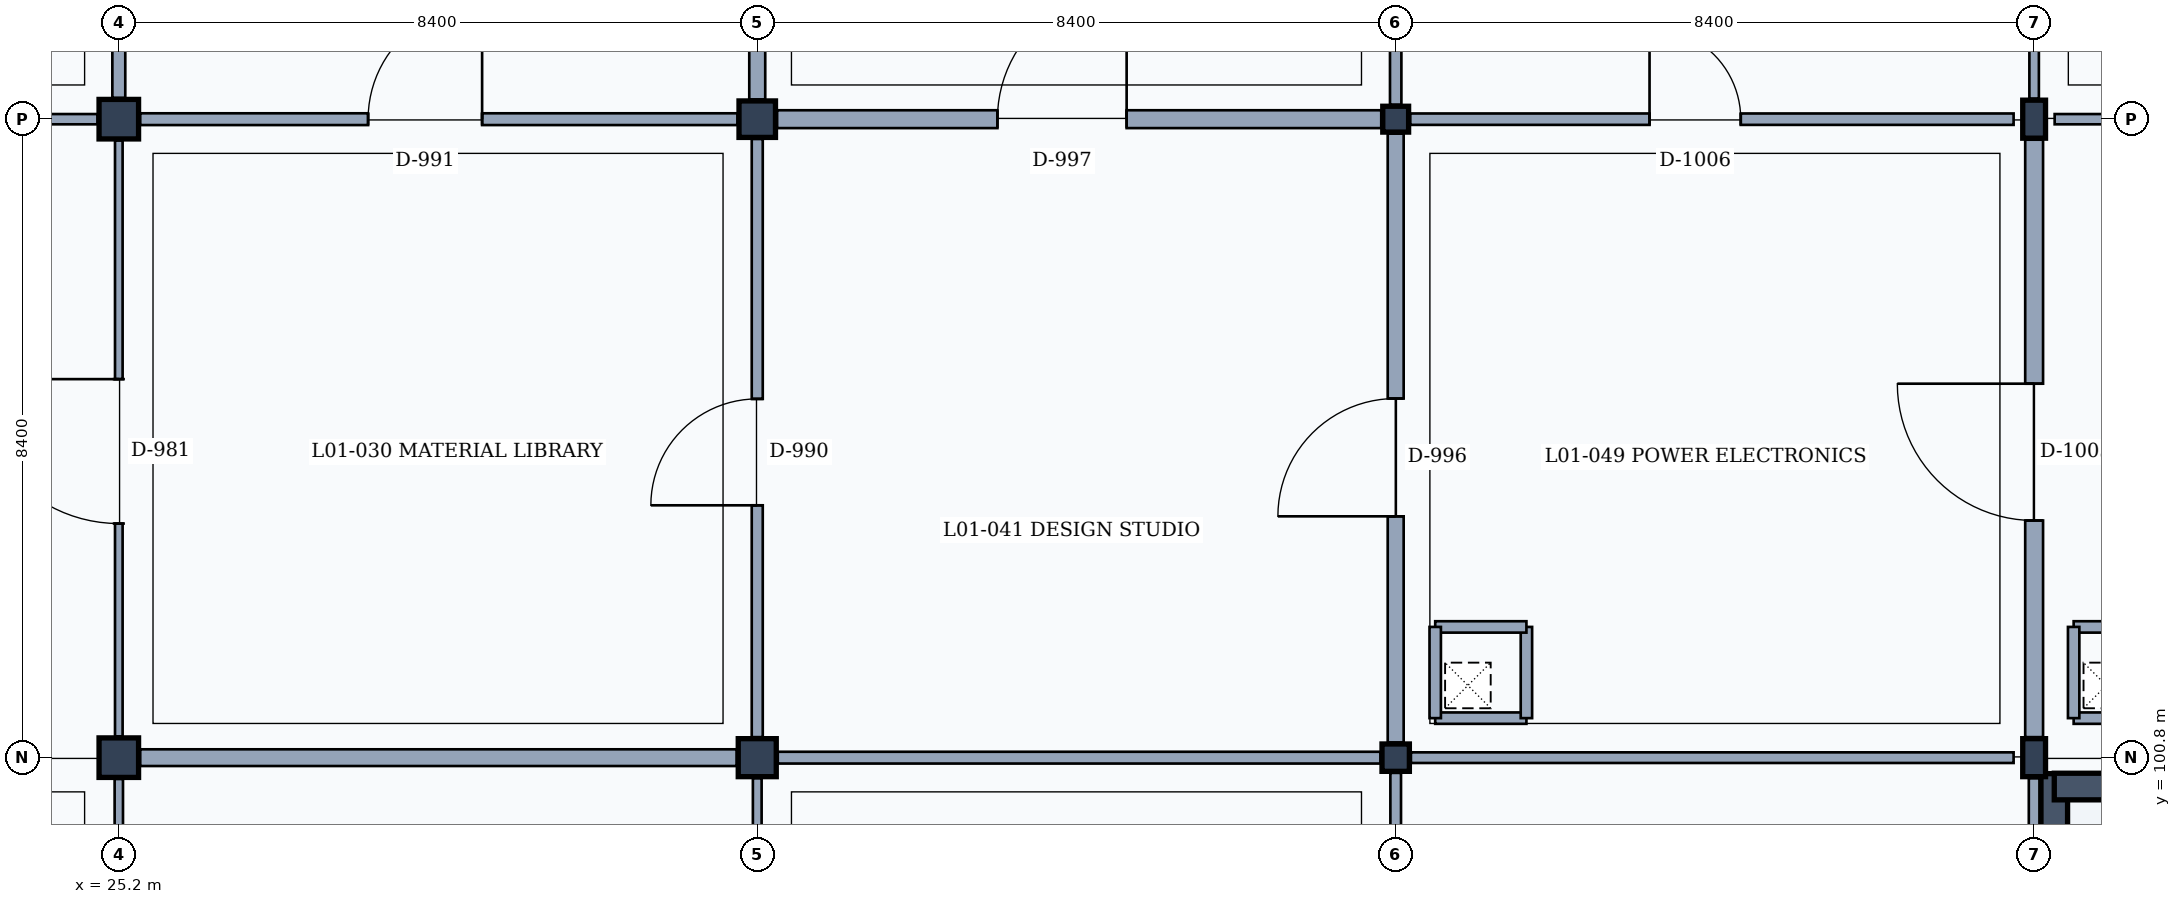
"""IFC4 building model, lengths in metres.
Left out: names, types, materials, properties, quantities, classifications, styles, units other than length and angle.
Written with IfcOpenShell. Run it as: python <this file> out.ifc"""

import sys

from ifc_helpers import new_model, si_unit, direction, frame, frame_2d, origin, origin_2d, place, context, subcontext, project, spatial, rectangle, i_section, extrude, element, fill, save


model = new_model("IFC4")
c1 = context("Model", 3, precision=1e-05, world=origin(), true_north=direction((0.0, 1.0)))
c2 = subcontext(c1, "Body", "Model", "MODEL_VIEW")
j1 = project(units=[si_unit("LENGTHUNIT", "METRE"), si_unit("PLANEANGLEUNIT", "RADIAN")], contexts=[c1])
p1 = place(None, origin())
s1 = spatial("IfcSite", under=j1, at=p1, CompositionType="ELEMENT")
p2 = place(p1, origin())
s2 = spatial("IfcBuilding", under=s1, at=p2, CompositionType="ELEMENT")
p3 = place(p2, frame((0.0, 0.0, 4.8)))
s3 = spatial("IfcBuildingStorey", under=s2, at=p3, CompositionType="ELEMENT", Elevation=4.8)
for number, where, z_axis, x_axis in (
    (1, (25.2, 100.8, 0.0), (0.0, 0.0, 1.0), (1.0, 0.0, 0.0)),
    (2, (25.2, 109.2, 0.0), (0.0, 0.0, 1.0), (1.0, 0.0, 0.0)),
):
    element("IfcColumn", number, at=place(p3, frame(where, z_axis=z_axis, x_axis=x_axis)), inside=s3, PredefinedType="COLUMN", context=c2, shape_type="SweptSolid", body=[
        extrude(rectangle(XDim=0.52, YDim=0.52, at=origin_2d()), origin(), (0.0, 0.0, 1.0), 4.8),
    ])
p4 = place(p3, frame((33.6, 100.8, 0.0), z_axis=(0.0, 0.0, 1.0), x_axis=(1.0, 0.0, 0.0)))
e3 = element("IfcColumn", 3, at=p4, inside=s3, PredefinedType="COLUMN", context=c2, shape_type="SweptSolid", body=[
    extrude(rectangle(XDim=0.5, YDim=0.5, at=origin_2d()), origin(), (0.0, 0.0, 1.0), 4.8),
])
p5 = place(p3, frame((33.6, 109.2, 0.0), z_axis=(0.0, 0.0, 1.0), x_axis=(1.0, 0.0, 0.0)))
e4 = element("IfcColumn", 4, at=p5, inside=s3, PredefinedType="COLUMN", context=c2, shape_type="SweptSolid", body=[
    extrude(rectangle(XDim=0.48, YDim=0.48, at=origin_2d()), origin(), (0.0, 0.0, 1.0), 4.8),
])
p6 = place(p3, frame((42.0, 100.8, 0.0), z_axis=(0.0, 0.0, 1.0), x_axis=(1.0, 0.0, 0.0)))
e5 = element("IfcColumn", 5, at=p6, inside=s3, PredefinedType="COLUMN", context=c2, shape_type="SweptSolid", body=[
    extrude(rectangle(XDim=0.36, YDim=0.36, at=origin_2d()), origin(), (0.0, 0.0, 1.0), 4.8),
])
p7 = place(p3, frame((42.0, 109.2, 0.0), z_axis=(0.0, 0.0, 1.0), x_axis=(1.0, 0.0, 0.0)))
e6 = element("IfcColumn", 6, at=p7, inside=s3, PredefinedType="COLUMN", context=c2, shape_type="SweptSolid", body=[
    extrude(rectangle(XDim=0.34, YDim=0.34, at=origin_2d()), origin(), (0.0, 0.0, 1.0), 4.8),
])
for number, where, z_axis, x_axis in (
    (7, (50.4, 100.8, 0.0), (0.0, 0.0, 1.0), (1.0, 0.0, 0.0)),
    (8, (50.4, 109.2, 0.0), (0.0, 0.0, 1.0), (1.0, 0.0, 0.0)),
):
    element("IfcColumn", number, at=place(p3, frame(where, z_axis=z_axis, x_axis=x_axis)), inside=s3, PredefinedType="COLUMN", context=c2, shape_type="SweptSolid", body=[
        extrude(i_section(OverallWidth=0.3, OverallDepth=0.5, WebThickness=0.014, FlangeThickness=0.028, FilletRadius=0.027, at=origin_2d()), origin(), (0.0, 0.0, 1.0), 4.8),
    ])
p8 = place(p3, frame((50.665, 92.65, 0.0), z_axis=(0.0, 0.0, 1.0), x_axis=(0.0, 1.0, 0.0)))
e9 = element("IfcWall", 9, at=p8, inside=s3, PredefinedType="SHEAR", context=c2, shape_type="SweptSolid", body=[
    extrude(rectangle(XDim=7.94, YDim=0.35, at=frame_2d((3.97, 0.0))), origin(), (0.0, 0.0, 1.0), 4.56),
])
p9 = place(p3, frame((50.665, 100.42, 0.0), z_axis=(0.0, 0.0, 1.0), x_axis=(1.0, 0.0, 0.0)))
e10 = element("IfcWall", 10, at=p9, inside=s3, PredefinedType="SHEAR", context=c2, shape_type="SweptSolid", body=[
    extrude(rectangle(XDim=7.875, YDim=0.35, at=frame_2d((3.938, 0.0))), origin(), (0.0, 0.0, 1.0), 4.56),
])
for number, where, z_axis, x_axis in (
    (11, (42.52, 101.32, 0.0), (0.0, 0.0, 1.0), (1.0, 0.0, 0.0)),
    (12, (43.72, 101.32, 0.0), (0.0, 0.0, 1.0), (0.0, 1.0, 0.0)),
    (13, (43.72, 102.52, 0.0), (0.0, 0.0, 1.0), (-1.0, 0.0, 0.0)),
    (14, (42.52, 102.52, 0.0), (0.0, 0.0, 1.0), (0.0, -1.0, 0.0)),
):
    element("IfcWall", number, at=place(p3, frame(where, z_axis=z_axis, x_axis=x_axis)), inside=s3, PredefinedType="PARTITIONING", context=c2, shape_type="SweptSolid", body=[
        extrude(rectangle(XDim=1.2, YDim=0.15, at=frame_2d((0.6, 0.0))), origin(), (0.0, 0.0, 1.0), 4.53),
    ])
for number, where, z_axis, x_axis in (
    (15, (50.92, 101.32, 0.0), (0.0, 0.0, 1.0), (1.0, 0.0, 0.0)),
    (16, (52.12, 102.52, 0.0), (0.0, 0.0, 1.0), (-1.0, 0.0, 0.0)),
):
    element("IfcWall", number, at=place(p3, frame(where, z_axis=z_axis, x_axis=x_axis)), inside=s3, PredefinedType="PARTITIONING", context=c2, shape_type="SweptSolid", body=[
        extrude(rectangle(XDim=1.2, YDim=0.15, at=frame_2d((0.6, 0.0))), origin(), (0.0, 0.0, 1.0), 4.56),
    ])
p10 = place(p3, frame((50.92, 102.52, 0.0), z_axis=(0.0, 0.0, 1.0), x_axis=(0.0, -1.0, 0.0)))
e17 = element("IfcWall", 17, at=p10, inside=s3, PredefinedType="PARTITIONING", context=c2, shape_type="SweptSolid", body=[
    extrude(rectangle(XDim=1.2, YDim=0.15, at=frame_2d((0.6, 0.0))), origin(), (0.0, 0.0, 1.0), 4.56),
])
p11 = place(p3, frame((25.2, 92.68, 0.0), z_axis=(0.0, 0.0, 1.0), x_axis=(0.0, 1.0, 0.0)))
e18 = element("IfcWall", 18, at=p11, inside=s3, PredefinedType="PARTITIONING", context=c2, shape_type="SweptSolid", body=[
    extrude(rectangle(XDim=7.84, YDim=0.11, at=frame_2d((3.92, 0.0))), origin(), (0.0, 0.0, 1.0), 3.92),
])
p12 = place(p11, frame((2.9, 0.0, 0.0)))
e19 = element("IfcOpeningElement", 19, at=p12, cuts=e18, PredefinedType="OPENING", context=c2, shape_type="SweptSolid", body=[
    extrude(rectangle(XDim=1.7, YDim=2.3, at=frame_2d((0.85, 1.15))), frame((0.0, 0.065, 0.0), z_axis=(0.0, -1.0, 0.0), x_axis=(1.0, 0.0, 0.0)), (0.0, 0.0, 1.0), 0.13),
])
p13 = place(p3, frame((25.2, 101.08, 0.0), z_axis=(0.0, 0.0, 1.0), x_axis=(0.0, 1.0, 0.0)))
e20 = element("IfcWall", 20, at=p13, inside=s3, PredefinedType="MOVABLE", context=c2, shape_type="SweptSolid", body=[
    extrude(rectangle(XDim=7.84, YDim=0.1, at=frame_2d((3.92, 0.0))), origin(), (0.0, 0.0, 1.0), 3.92),
])
p14 = place(p13, frame((2.8, 0.0, 0.0)))
e21 = element("IfcOpeningElement", 21, at=p14, cuts=e20, PredefinedType="OPENING", context=c2, shape_type="SweptSolid", body=[
    extrude(rectangle(XDim=1.9, YDim=2.4, at=frame_2d((0.95, 1.2))), frame((0.0, 0.06, 0.0), z_axis=(0.0, -1.0, 0.0), x_axis=(1.0, 0.0, 0.0)), (0.0, 0.0, 1.0), 0.12),
])
p15 = place(p3, frame((17.08, 109.2, 0.0), z_axis=(0.0, 0.0, 1.0), x_axis=(1.0, 0.0, 0.0)))
e22 = element("IfcWall", 22, at=p15, inside=s3, PredefinedType="PARTITIONING", context=c2, shape_type="SweptSolid", body=[
    extrude(rectangle(XDim=7.84, YDim=0.135, at=frame_2d((3.92, 0.0))), origin(), (0.0, 0.0, 1.0), 3.92),
])
p16 = place(p15, frame((3.3, 0.0, 0.0)))
e23 = element("IfcOpeningElement", 23, at=p16, cuts=e22, PredefinedType="OPENING", context=c2, shape_type="SweptSolid", body=[
    extrude(rectangle(XDim=0.9, YDim=2.1, at=frame_2d((0.45, 1.05))), frame((0.0, 0.077, 0.0), z_axis=(0.0, -1.0, 0.0), x_axis=(1.0, 0.0, 0.0)), (0.0, 0.0, 1.0), 0.155),
])
p17 = place(p3, frame((25.2, 109.48, 0.0), z_axis=(0.0, 0.0, 1.0), x_axis=(0.0, 1.0, 0.0)))
e24 = element("IfcWall", 24, at=p17, inside=s3, PredefinedType="PARTITIONING", context=c2, shape_type="SweptSolid", body=[
    extrude(rectangle(XDim=7.84, YDim=0.17, at=frame_2d((3.92, 0.0))), origin(), (0.0, 0.0, 1.0), 3.92),
])
p18 = place(p3, frame((33.6, 92.66, 0.0), z_axis=(0.0, 0.0, 1.0), x_axis=(0.0, 1.0, 0.0)))
e25 = element("IfcWall", 25, at=p18, inside=s3, PredefinedType="PARTITIONING", context=c2, shape_type="SweptSolid", body=[
    extrude(rectangle(XDim=7.87, YDim=0.115, at=frame_2d((3.935, 0.0))), origin(), (0.0, 0.0, 1.0), 3.92),
])
p19 = place(p3, frame((25.48, 100.8, 0.0), z_axis=(0.0, 0.0, 1.0), x_axis=(1.0, 0.0, 0.0)))
e26 = element("IfcWall", 26, at=p19, inside=s3, PredefinedType="PARTITIONING", context=c2, shape_type="SweptSolid", body=[
    extrude(rectangle(XDim=7.85, YDim=0.22, at=frame_2d((3.925, 0.0))), origin(), (0.0, 0.0, 1.0), 3.89),
])
p20 = place(p3, frame((33.6, 101.07, 0.0), z_axis=(0.0, 0.0, 1.0), x_axis=(0.0, 1.0, 0.0)))
e27 = element("IfcWall", 27, at=p20, inside=s3, PredefinedType="PARTITIONING", context=c2, shape_type="SweptSolid", body=[
    extrude(rectangle(XDim=7.87, YDim=0.145, at=frame_2d((3.935, 0.0))), origin(), (0.0, 0.0, 1.0), 3.92),
])
p21 = place(p20, frame((3.05, 0.0, 0.0)))
e28 = element("IfcOpeningElement", 28, at=p21, cuts=e27, PredefinedType="OPENING", context=c2, shape_type="SweptSolid", body=[
    extrude(rectangle(XDim=1.4, YDim=2.25, at=frame_2d((0.7, 1.125))), frame((0.0, 0.083, 0.0), z_axis=(0.0, -1.0, 0.0), x_axis=(1.0, 0.0, 0.0)), (0.0, 0.0, 1.0), 0.165),
])
p22 = place(p3, frame((25.48, 109.2, 0.0), z_axis=(0.0, 0.0, 1.0), x_axis=(1.0, 0.0, 0.0)))
e29 = element("IfcWall", 29, at=p22, inside=s3, PredefinedType="PARTITIONING", context=c2, shape_type="SweptSolid", body=[
    extrude(rectangle(XDim=7.86, YDim=0.155, at=frame_2d((3.93, 0.0))), origin(), (0.0, 0.0, 1.0), 3.89),
])
p23 = place(p22, frame((3.0, 0.0, 0.0)))
e30 = element("IfcOpeningElement", 30, at=p23, cuts=e29, PredefinedType="OPENING", context=c2, shape_type="SweptSolid", body=[
    extrude(rectangle(XDim=1.5, YDim=2.3, at=frame_2d((0.75, 1.15))), frame((0.0, 0.087, 0.0), z_axis=(0.0, -1.0, 0.0), x_axis=(1.0, 0.0, 0.0)), (0.0, 0.0, 1.0), 0.175),
])
p24 = place(p3, frame((33.6, 109.46, 0.0), z_axis=(0.0, 0.0, 1.0), x_axis=(0.0, 1.0, 0.0)))
e31 = element("IfcWall", 31, at=p24, inside=s3, PredefinedType="PARTITIONING", context=c2, shape_type="SweptSolid", body=[
    extrude(rectangle(XDim=7.87, YDim=0.21, at=frame_2d((3.935, 0.0))), origin(), (0.0, 0.0, 1.0), 3.92),
])
p25 = place(p3, frame((42.0, 92.59, 0.0), z_axis=(0.0, 0.0, 1.0), x_axis=(0.0, 1.0, 0.0)))
e32 = element("IfcWall", 32, at=p25, inside=s3, PredefinedType="PARTITIONING", context=c2, shape_type="SweptSolid", body=[
    extrude(rectangle(XDim=8.01, YDim=0.14, at=frame_2d((4.005, 0.0))), origin(), (0.0, 0.0, 1.0), 3.92),
])
p26 = place(p3, frame((33.87, 100.8, 0.0), z_axis=(0.0, 0.0, 1.0), x_axis=(1.0, 0.0, 0.0)))
e33 = element("IfcWall", 33, at=p26, inside=s3, PredefinedType="PARTITIONING", context=c2, shape_type="SweptSolid", body=[
    extrude(rectangle(XDim=7.93, YDim=0.155, at=frame_2d((3.965, 0.0))), origin(), (0.0, 0.0, 1.0), 3.89),
])
p27 = place(p3, frame((42.0, 101.0, 0.0), z_axis=(0.0, 0.0, 1.0), x_axis=(0.0, 1.0, 0.0)))
e34 = element("IfcWall", 34, at=p27, inside=s3, PredefinedType="PARTITIONING", context=c2, shape_type="SweptSolid", body=[
    extrude(rectangle(XDim=8.01, YDim=0.21, at=frame_2d((4.005, 0.0))), origin(), (0.0, 0.0, 1.0), 3.92),
])
p28 = place(p27, frame((2.975, 0.0, 0.0)))
e35 = element("IfcOpeningElement", 35, at=p28, cuts=e34, PredefinedType="OPENING", context=c2, shape_type="SweptSolid", body=[
    extrude(rectangle(XDim=1.55, YDim=2.35, at=frame_2d((0.775, 1.175))), frame((0.0, 0.115, 0.0), z_axis=(0.0, -1.0, 0.0), x_axis=(1.0, 0.0, 0.0)), (0.0, 0.0, 1.0), 0.23),
])
p29 = place(p3, frame((33.86, 109.2, 0.0), z_axis=(0.0, 0.0, 1.0), x_axis=(1.0, 0.0, 0.0)))
e36 = element("IfcWall", 36, at=p29, inside=s3, PredefinedType="PARTITIONING", context=c2, shape_type="SweptSolid", body=[
    extrude(rectangle(XDim=7.95, YDim=0.235, at=frame_2d((3.975, 0.0))), origin(), (0.0, 0.0, 1.0), 3.89),
])
p30 = place(p29, frame((2.9, 0.0, 0.0)))
e37 = element("IfcOpeningElement", 37, at=p30, cuts=e36, PredefinedType="OPENING", context=c2, shape_type="SweptSolid", body=[
    extrude(rectangle(XDim=1.7, YDim=2.3, at=frame_2d((0.85, 1.15))), frame((0.0, 0.127, 0.0), z_axis=(0.0, -1.0, 0.0), x_axis=(1.0, 0.0, 0.0)), (0.0, 0.0, 1.0), 0.255),
])
p31 = place(p3, frame((42.0, 109.39, 0.0), z_axis=(0.0, 0.0, 1.0), x_axis=(0.0, 1.0, 0.0)))
e38 = element("IfcWall", 38, at=p31, inside=s3, PredefinedType="PARTITIONING", context=c2, shape_type="SweptSolid", body=[
    extrude(rectangle(XDim=8.01, YDim=0.15, at=frame_2d((4.005, 0.0))), origin(), (0.0, 0.0, 1.0), 3.92),
])
p32 = place(p3, frame((50.4, 92.67, 0.0), z_axis=(0.0, 0.0, 1.0), x_axis=(0.0, 1.0, 0.0)))
e39 = element("IfcWall", 39, at=p32, inside=s3, PredefinedType="PARTITIONING", context=c2, shape_type="SweptSolid", body=[
    extrude(rectangle(XDim=7.86, YDim=0.14, at=frame_2d((3.93, 0.0))), origin(), (0.0, 0.0, 1.0), 3.92),
])
p33 = place(p3, frame((42.2, 100.8, 0.0), z_axis=(0.0, 0.0, 1.0), x_axis=(1.0, 0.0, 0.0)))
e40 = element("IfcWall", 40, at=p33, inside=s3, PredefinedType="PARTITIONING", context=c2, shape_type="SweptSolid", body=[
    extrude(rectangle(XDim=7.93, YDim=0.14, at=frame_2d((3.965, 0.0))), origin(), (0.0, 0.0, 1.0), 3.89),
])
p34 = place(p3, frame((50.4, 101.07, 0.0), z_axis=(0.0, 0.0, 1.0), x_axis=(0.0, 1.0, 0.0)))
e41 = element("IfcWall", 41, at=p34, inside=s3, PredefinedType="PARTITIONING", context=c2, shape_type="SweptSolid", body=[
    extrude(rectangle(XDim=7.86, YDim=0.235, at=frame_2d((3.93, 0.0))), origin(), (0.0, 0.0, 1.0), 3.92),
])
p35 = place(p34, frame((2.85, 0.0, 0.0)))
e42 = element("IfcOpeningElement", 42, at=p35, cuts=e41, PredefinedType="OPENING", context=c2, shape_type="SweptSolid", body=[
    extrude(rectangle(XDim=1.8, YDim=2.3, at=frame_2d((0.9, 1.15))), frame((0.0, 0.127, 0.0), z_axis=(0.0, -1.0, 0.0), x_axis=(1.0, 0.0, 0.0)), (0.0, 0.0, 1.0), 0.255),
])
p36 = place(p3, frame((42.19, 109.2, 0.0), z_axis=(0.0, 0.0, 1.0), x_axis=(1.0, 0.0, 0.0)))
e43 = element("IfcWall", 43, at=p36, inside=s3, PredefinedType="PARTITIONING", context=c2, shape_type="SweptSolid", body=[
    extrude(rectangle(XDim=7.94, YDim=0.15, at=frame_2d((3.97, 0.0))), origin(), (0.0, 0.0, 1.0), 3.89),
])
p37 = place(p36, frame((3.15, 0.0, 0.0)))
e44 = element("IfcOpeningElement", 44, at=p37, cuts=e43, PredefinedType="OPENING", context=c2, shape_type="SweptSolid", body=[
    extrude(rectangle(XDim=1.2, YDim=2.2, at=frame_2d((0.6, 1.1))), frame((0.0, 0.085, 0.0), z_axis=(0.0, -1.0, 0.0), x_axis=(1.0, 0.0, 0.0)), (0.0, 0.0, 1.0), 0.17),
])
p38 = place(p3, frame((50.4, 109.47, 0.0), z_axis=(0.0, 0.0, 1.0), x_axis=(0.0, 1.0, 0.0)))
e45 = element("IfcWall", 45, at=p38, inside=s3, PredefinedType="PARTITIONING", context=c2, shape_type="SweptSolid", body=[
    extrude(rectangle(XDim=7.86, YDim=0.125, at=frame_2d((3.93, 0.0))), origin(), (0.0, 0.0, 1.0), 3.92),
])
p39 = place(p3, frame((50.67, 109.2, 0.0), z_axis=(0.0, 0.0, 1.0), x_axis=(1.0, 0.0, 0.0)))
e46 = element("IfcWall", 46, at=p39, inside=s3, PredefinedType="PARTITIONING", context=c2, shape_type="SweptSolid", body=[
    extrude(rectangle(XDim=7.9, YDim=0.135, at=frame_2d((3.95, 0.0))), origin(), (0.0, 0.0, 1.0), 3.92),
])
p40 = place(p39, frame((3.175, 0.0, 0.0)))
e47 = element("IfcOpeningElement", 47, at=p40, cuts=e46, PredefinedType="OPENING", context=c2, shape_type="SweptSolid", body=[
    extrude(rectangle(XDim=1.15, YDim=2.25, at=frame_2d((0.575, 1.125))), frame((0.0, 0.077, 0.0), z_axis=(0.0, -1.0, 0.0), x_axis=(1.0, 0.0, 0.0)), (0.0, 0.0, 1.0), 0.155),
])
p41 = place(p14, origin())
e48 = element("IfcDoor", 48, at=p41, inside=s3, OperationType="SINGLE_SWING_RIGHT", PredefinedType="DOOR", context=c2, shape_type="SweptSolid", body=[
    extrude(rectangle(XDim=1.9, YDim=2.4, at=frame_2d((0.95, 1.2))), frame((0.0, 0.025, 0.0), z_axis=(0.0, -1.0, 0.0), x_axis=(1.0, 0.0, 0.0)), (0.0, 0.0, 1.0), 0.05),
])
fill(e21, e48)
p42 = place(p21, origin())
e49 = element("IfcDoor", 49, at=p42, inside=s3, OperationType="SINGLE_SWING_LEFT", PredefinedType="DOOR", context=c2, shape_type="SweptSolid", body=[
    extrude(rectangle(XDim=1.4, YDim=2.25, at=frame_2d((0.7, 1.125))), frame((0.0, 0.025, 0.0), z_axis=(0.0, -1.0, 0.0), x_axis=(1.0, 0.0, 0.0)), (0.0, 0.0, 1.0), 0.05),
])
fill(e28, e49)
p43 = place(p23, origin())
e50 = element("IfcDoor", 50, at=p43, inside=s3, OperationType="SINGLE_SWING_RIGHT", PredefinedType="DOOR", context=c2, shape_type="SweptSolid", body=[
    extrude(rectangle(XDim=1.5, YDim=2.3, at=frame_2d((0.75, 1.15))), frame((0.0, 0.025, 0.0), z_axis=(0.0, -1.0, 0.0), x_axis=(1.0, 0.0, 0.0)), (0.0, 0.0, 1.0), 0.05),
])
fill(e30, e50)
p44 = place(p28, origin())
e51 = element("IfcDoor", 51, at=p44, inside=s3, OperationType="SINGLE_SWING_LEFT", PredefinedType="DOOR", context=c2, shape_type="SweptSolid", body=[
    extrude(rectangle(XDim=1.55, YDim=2.35, at=frame_2d((0.775, 1.175))), frame((0.0, 0.025, 0.0), z_axis=(0.0, -1.0, 0.0), x_axis=(1.0, 0.0, 0.0)), (0.0, 0.0, 1.0), 0.05),
])
fill(e35, e51)
p45 = place(p30, origin())
e52 = element("IfcDoor", 52, at=p45, inside=s3, OperationType="SINGLE_SWING_RIGHT", PredefinedType="DOOR", context=c2, shape_type="SweptSolid", body=[
    extrude(rectangle(XDim=1.7, YDim=2.3, at=frame_2d((0.85, 1.15))), frame((0.0, 0.025, 0.0), z_axis=(0.0, -1.0, 0.0), x_axis=(1.0, 0.0, 0.0)), (0.0, 0.0, 1.0), 0.05),
])
fill(e37, e52)
p46 = place(p35, origin())
e53 = element("IfcDoor", 53, at=p46, inside=s3, OperationType="SINGLE_SWING_RIGHT", PredefinedType="DOOR", context=c2, shape_type="SweptSolid", body=[
    extrude(rectangle(XDim=1.8, YDim=2.3, at=frame_2d((0.9, 1.15))), frame((0.0, 0.025, 0.0), z_axis=(0.0, -1.0, 0.0), x_axis=(1.0, 0.0, 0.0)), (0.0, 0.0, 1.0), 0.05),
])
fill(e42, e53)
p47 = place(p37, origin())
e54 = element("IfcDoor", 54, at=p47, inside=s3, OperationType="SINGLE_SWING_LEFT", PredefinedType="DOOR", context=c2, shape_type="SweptSolid", body=[
    extrude(rectangle(XDim=1.2, YDim=2.2, at=frame_2d((0.6, 1.1))), frame((0.0, 0.025, 0.0), z_axis=(0.0, -1.0, 0.0), x_axis=(1.0, 0.0, 0.0)), (0.0, 0.0, 1.0), 0.05),
])
fill(e44, e54)
save(model, sys.argv[1])
